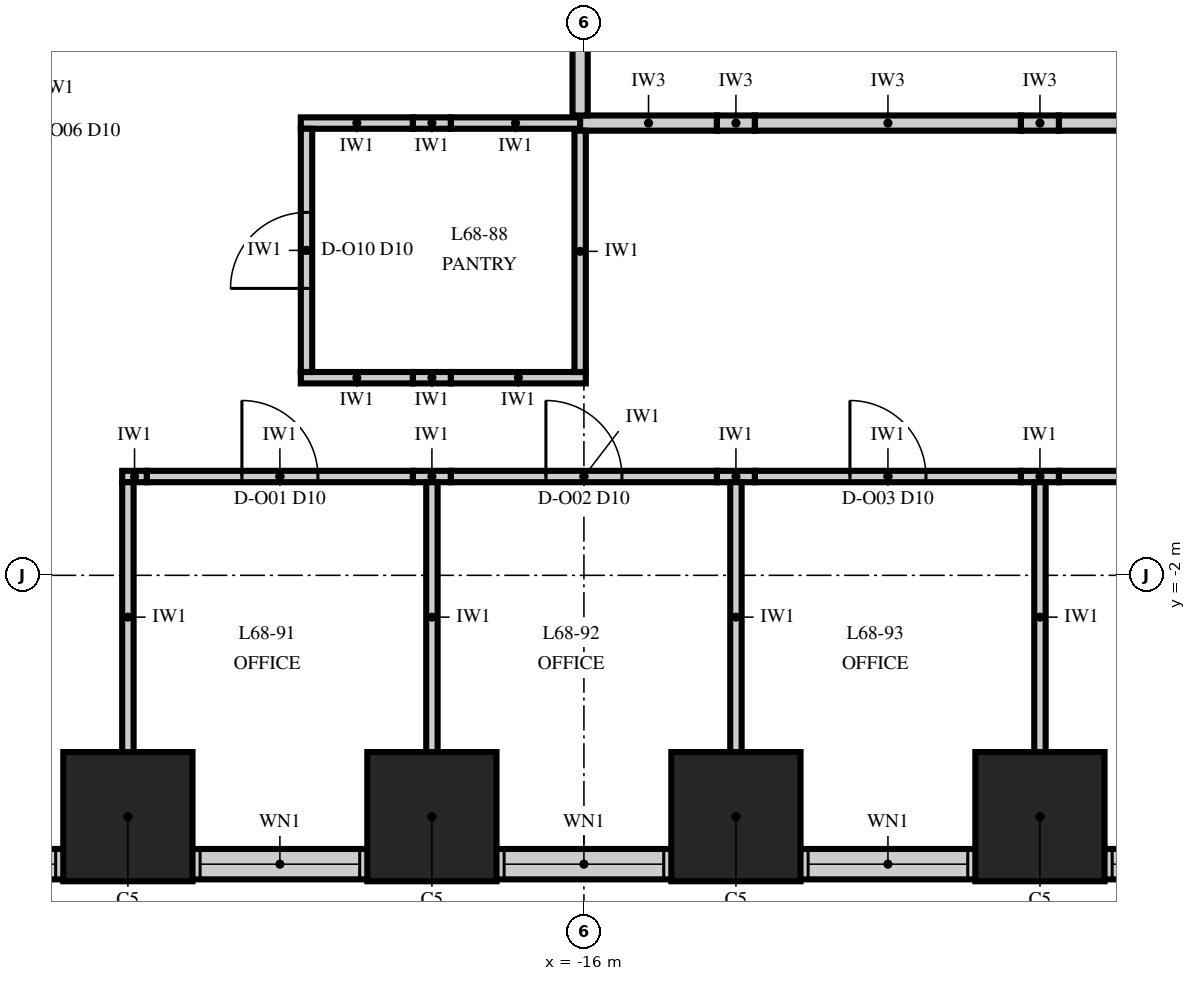
"""IFC4 building model, lengths in metres.
Left out: names, types, materials, properties, quantities, classifications, styles, units other than length and angle.
Written with IfcOpenShell. Run it as: python <this file> out.ifc"""

import sys

from ifc_helpers import new_model, si_unit, direction, frame, frame_2d, origin, origin_2d, place, context, subcontext, project, spatial, rectangle, extrude, element, fill, save


model = new_model("IFC4")
c1 = context("Model", 3, precision=1e-05, world=origin(), true_north=direction((0.0, 1.0)))
c2 = subcontext(c1, "Body", "Model", "MODEL_VIEW")
j1 = project(units=[si_unit("LENGTHUNIT", "METRE"), si_unit("PLANEANGLEUNIT", "RADIAN")], contexts=[c1])
p1 = place(None, origin())
s1 = spatial("IfcSite", under=j1, at=p1, CompositionType="ELEMENT")
p2 = place(p1, origin())
s2 = spatial("IfcBuilding", under=s1, at=p2, CompositionType="ELEMENT")
p3 = place(p2, frame((0.0, 0.0, 292.0)))
s3 = spatial("IfcBuildingStorey", under=s2, at=p3, CompositionType="ELEMENT", Elevation=292.0)
for number, where, z_axis, x_axis in (
    (1, (-22.0, -5.175, 0.0), (0.0, 0.0, 1.0), (1.0, 0.0, 0.0)),
    (2, (-18.0, -5.175, 0.0), (0.0, 0.0, 1.0), (1.0, 0.0, 0.0)),
    (3, (-14.0, -5.175, 0.0), (0.0, 0.0, 1.0), (1.0, 0.0, 0.0)),
    (4, (-10.0, -5.175, 0.0), (0.0, 0.0, 1.0), (1.0, 0.0, 0.0)),
):
    element("IfcColumn", number, at=place(p3, frame(where, z_axis=z_axis, x_axis=x_axis)), inside=s3, PredefinedType="COLUMN", context=c2, shape_type="SweptSolid", body=[
        extrude(rectangle(XDim=1.7, YDim=1.7, at=origin_2d()), origin(), (0.0, 0.0, 1.0), 3.75),
    ])
p4 = place(p3, frame((-26.0, -5.8, 0.0), z_axis=(0.0, 0.0, 1.0), x_axis=(1.0, 0.0, 0.0)))
e5 = element("IfcWall", 5, at=p4, inside=s3, PredefinedType="SOLIDWALL", context=c2, shape_type="SweptSolid", body=[
    extrude(rectangle(XDim=52.0, YDim=0.4, at=frame_2d((26.0, 0.0))), origin(), (0.0, 0.0, 1.0), 2.0),
])
p5 = place(p4, frame((0.95, 0.0, 0.8)))
e6 = element("IfcOpeningElement", 6, at=p5, cuts=e5, PredefinedType="OPENING", context=c2, shape_type="SweptSolid", body=[
    extrude(rectangle(XDim=2.1, YDim=1.15, at=frame_2d((1.05, 0.575))), frame((0.0, 0.215, 0.0), z_axis=(0.0, -1.0, 0.0), x_axis=(1.0, 0.0, 0.0)), (0.0, 0.0, 1.0), 0.43),
])
p6 = place(p4, frame((4.95, 0.0, 0.8)))
e7 = element("IfcOpeningElement", 7, at=p6, cuts=e5, PredefinedType="OPENING", context=c2, shape_type="SweptSolid", body=[
    extrude(rectangle(XDim=2.1, YDim=1.15, at=frame_2d((1.05, 0.575))), frame((0.0, 0.215, 0.0), z_axis=(0.0, -1.0, 0.0), x_axis=(1.0, 0.0, 0.0)), (0.0, 0.0, 1.0), 0.43),
])
p7 = place(p4, frame((8.95, 0.0, 0.8)))
e8 = element("IfcOpeningElement", 8, at=p7, cuts=e5, PredefinedType="OPENING", context=c2, shape_type="SweptSolid", body=[
    extrude(rectangle(XDim=2.1, YDim=1.15, at=frame_2d((1.05, 0.575))), frame((0.0, 0.215, 0.0), z_axis=(0.0, -1.0, 0.0), x_axis=(1.0, 0.0, 0.0)), (0.0, 0.0, 1.0), 0.43),
])
p8 = place(p4, frame((12.95, 0.0, 0.8)))
e9 = element("IfcOpeningElement", 9, at=p8, cuts=e5, PredefinedType="OPENING", context=c2, shape_type="SweptSolid", body=[
    extrude(rectangle(XDim=2.1, YDim=1.15, at=frame_2d((1.05, 0.575))), frame((0.0, 0.215, 0.0), z_axis=(0.0, -1.0, 0.0), x_axis=(1.0, 0.0, 0.0)), (0.0, 0.0, 1.0), 0.43),
])
p9 = place(p4, frame((16.95, 0.0, 0.8)))
e10 = element("IfcOpeningElement", 10, at=p9, cuts=e5, PredefinedType="OPENING", context=c2, shape_type="SweptSolid", body=[
    extrude(rectangle(XDim=2.1, YDim=1.15, at=frame_2d((1.05, 0.575))), frame((0.0, 0.215, 0.0), z_axis=(0.0, -1.0, 0.0), x_axis=(1.0, 0.0, 0.0)), (0.0, 0.0, 1.0), 0.43),
])
p10 = place(p4, frame((20.95, 0.0, 0.8)))
e11 = element("IfcOpeningElement", 11, at=p10, cuts=e5, PredefinedType="OPENING", context=c2, shape_type="SweptSolid", body=[
    extrude(rectangle(XDim=2.1, YDim=1.15, at=frame_2d((1.05, 0.575))), frame((0.0, 0.215, 0.0), z_axis=(0.0, -1.0, 0.0), x_axis=(1.0, 0.0, 0.0)), (0.0, 0.0, 1.0), 0.43),
])
p11 = place(p4, frame((24.95, 0.0, 0.8)))
e12 = element("IfcOpeningElement", 12, at=p11, cuts=e5, PredefinedType="OPENING", context=c2, shape_type="SweptSolid", body=[
    extrude(rectangle(XDim=2.1, YDim=1.15, at=frame_2d((1.05, 0.575))), frame((0.0, 0.215, 0.0), z_axis=(0.0, -1.0, 0.0), x_axis=(1.0, 0.0, 0.0)), (0.0, 0.0, 1.0), 0.43),
])
p12 = place(p4, frame((28.95, 0.0, 0.8)))
e13 = element("IfcOpeningElement", 13, at=p12, cuts=e5, PredefinedType="OPENING", context=c2, shape_type="SweptSolid", body=[
    extrude(rectangle(XDim=2.1, YDim=1.15, at=frame_2d((1.05, 0.575))), frame((0.0, 0.215, 0.0), z_axis=(0.0, -1.0, 0.0), x_axis=(1.0, 0.0, 0.0)), (0.0, 0.0, 1.0), 0.43),
])
p13 = place(p4, frame((32.95, 0.0, 0.8)))
e14 = element("IfcOpeningElement", 14, at=p13, cuts=e5, PredefinedType="OPENING", context=c2, shape_type="SweptSolid", body=[
    extrude(rectangle(XDim=2.1, YDim=1.15, at=frame_2d((1.05, 0.575))), frame((0.0, 0.215, 0.0), z_axis=(0.0, -1.0, 0.0), x_axis=(1.0, 0.0, 0.0)), (0.0, 0.0, 1.0), 0.43),
])
p14 = place(p4, frame((36.95, 0.0, 0.8)))
e15 = element("IfcOpeningElement", 15, at=p14, cuts=e5, PredefinedType="OPENING", context=c2, shape_type="SweptSolid", body=[
    extrude(rectangle(XDim=2.1, YDim=1.15, at=frame_2d((1.05, 0.575))), frame((0.0, 0.215, 0.0), z_axis=(0.0, -1.0, 0.0), x_axis=(1.0, 0.0, 0.0)), (0.0, 0.0, 1.0), 0.43),
])
p15 = place(p4, frame((40.95, 0.0, 0.8)))
e16 = element("IfcOpeningElement", 16, at=p15, cuts=e5, PredefinedType="OPENING", context=c2, shape_type="SweptSolid", body=[
    extrude(rectangle(XDim=2.1, YDim=1.15, at=frame_2d((1.05, 0.575))), frame((0.0, 0.215, 0.0), z_axis=(0.0, -1.0, 0.0), x_axis=(1.0, 0.0, 0.0)), (0.0, 0.0, 1.0), 0.43),
])
p16 = place(p4, frame((44.95, 0.0, 0.8)))
e17 = element("IfcOpeningElement", 17, at=p16, cuts=e5, PredefinedType="OPENING", context=c2, shape_type="SweptSolid", body=[
    extrude(rectangle(XDim=2.1, YDim=1.15, at=frame_2d((1.05, 0.575))), frame((0.0, 0.215, 0.0), z_axis=(0.0, -1.0, 0.0), x_axis=(1.0, 0.0, 0.0)), (0.0, 0.0, 1.0), 0.43),
])
p17 = place(p4, frame((48.95, 0.0, 0.8)))
e18 = element("IfcOpeningElement", 18, at=p17, cuts=e5, PredefinedType="OPENING", context=c2, shape_type="SweptSolid", body=[
    extrude(rectangle(XDim=2.1, YDim=1.15, at=frame_2d((1.05, 0.575))), frame((0.0, 0.215, 0.0), z_axis=(0.0, -1.0, 0.0), x_axis=(1.0, 0.0, 0.0)), (0.0, 0.0, 1.0), 0.43),
])
p18 = place(p3, frame((-22.075, -0.7, 0.0), z_axis=(0.0, 0.0, 1.0), x_axis=(1.0, 0.0, 0.0)))
e19 = element("IfcWall", 19, at=p18, inside=s3, PredefinedType="PARTITIONING", context=c2, shape_type="SweptSolid", body=[
    extrude(rectangle(XDim=0.325, YDim=0.15, at=frame_2d((0.163, 0.0))), origin(), (0.0, 0.0, 1.0), 2.15),
])
p19 = place(p3, frame((-21.75, -0.7, 0.0), z_axis=(0.0, 0.0, 1.0), x_axis=(1.0, 0.0, 0.0)))
e20 = element("IfcWall", 20, at=p19, inside=s3, PredefinedType="PARTITIONING", context=c2, shape_type="SweptSolid", body=[
    extrude(rectangle(XDim=3.5, YDim=0.15, at=frame_2d((1.75, 0.0))), origin(), (0.0, 0.0, 1.0), 3.85),
])
p20 = place(p19, frame((1.25, 0.0, 0.0)))
e21 = element("IfcOpeningElement", 21, at=p20, cuts=e20, PredefinedType="OPENING", context=c2, shape_type="SweptSolid", body=[
    extrude(rectangle(XDim=1.0, YDim=2.3, at=frame_2d((0.5, 1.15))), frame((0.0, 0.09, 0.0), z_axis=(0.0, -1.0, 0.0), x_axis=(1.0, 0.0, 0.0)), (0.0, 0.0, 1.0), 0.18),
])
p21 = place(p3, frame((-18.25, -0.7, 0.0), z_axis=(0.0, 0.0, 1.0), x_axis=(1.0, 0.0, 0.0)))
e22 = element("IfcWall", 22, at=p21, inside=s3, PredefinedType="PARTITIONING", context=c2, shape_type="SweptSolid", body=[
    extrude(rectangle(XDim=0.5, YDim=0.15, at=frame_2d((0.25, 0.0))), origin(), (0.0, 0.0, 1.0), 2.15),
])
p22 = place(p3, frame((-17.75, -0.7, 0.0), z_axis=(0.0, 0.0, 1.0), x_axis=(1.0, 0.0, 0.0)))
e23 = element("IfcWall", 23, at=p22, inside=s3, PredefinedType="PARTITIONING", context=c2, shape_type="SweptSolid", body=[
    extrude(rectangle(XDim=3.5, YDim=0.15, at=frame_2d((1.75, 0.0))), origin(), (0.0, 0.0, 1.0), 3.85),
])
p23 = place(p22, frame((1.25, 0.0, 0.0)))
e24 = element("IfcOpeningElement", 24, at=p23, cuts=e23, PredefinedType="OPENING", context=c2, shape_type="SweptSolid", body=[
    extrude(rectangle(XDim=1.0, YDim=2.3, at=frame_2d((0.5, 1.15))), frame((0.0, 0.09, 0.0), z_axis=(0.0, -1.0, 0.0), x_axis=(1.0, 0.0, 0.0)), (0.0, 0.0, 1.0), 0.18),
])
p24 = place(p3, frame((-14.25, -0.7, 0.0), z_axis=(0.0, 0.0, 1.0), x_axis=(1.0, 0.0, 0.0)))
e25 = element("IfcWall", 25, at=p24, inside=s3, PredefinedType="PARTITIONING", context=c2, shape_type="SweptSolid", body=[
    extrude(rectangle(XDim=0.5, YDim=0.15, at=frame_2d((0.25, 0.0))), origin(), (0.0, 0.0, 1.0), 2.15),
])
p25 = place(p3, frame((-13.75, -0.7, 0.0), z_axis=(0.0, 0.0, 1.0), x_axis=(1.0, 0.0, 0.0)))
e26 = element("IfcWall", 26, at=p25, inside=s3, PredefinedType="PARTITIONING", context=c2, shape_type="SweptSolid", body=[
    extrude(rectangle(XDim=3.5, YDim=0.15, at=frame_2d((1.75, 0.0))), origin(), (0.0, 0.0, 1.0), 3.85),
])
p26 = place(p25, frame((1.25, 0.0, 0.0)))
e27 = element("IfcOpeningElement", 27, at=p26, cuts=e26, PredefinedType="OPENING", context=c2, shape_type="SweptSolid", body=[
    extrude(rectangle(XDim=1.0, YDim=2.3, at=frame_2d((0.5, 1.15))), frame((0.0, 0.09, 0.0), z_axis=(0.0, -1.0, 0.0), x_axis=(1.0, 0.0, 0.0)), (0.0, 0.0, 1.0), 0.18),
])
p27 = place(p3, frame((-10.25, -0.7, 0.0), z_axis=(0.0, 0.0, 1.0), x_axis=(1.0, 0.0, 0.0)))
e28 = element("IfcWall", 28, at=p27, inside=s3, PredefinedType="PARTITIONING", context=c2, shape_type="SweptSolid", body=[
    extrude(rectangle(XDim=0.5, YDim=0.15, at=frame_2d((0.25, 0.0))), origin(), (0.0, 0.0, 1.0), 2.15),
])
p28 = place(p3, frame((-9.75, -0.7, 0.0), z_axis=(0.0, 0.0, 1.0), x_axis=(1.0, 0.0, 0.0)))
e29 = element("IfcWall", 29, at=p28, inside=s3, PredefinedType="PARTITIONING", context=c2, shape_type="SweptSolid", body=[
    extrude(rectangle(XDim=3.5, YDim=0.15, at=frame_2d((1.75, 0.0))), origin(), (0.0, 0.0, 1.0), 3.85),
])
p29 = place(p28, frame((1.25, 0.0, 0.0)))
e30 = element("IfcOpeningElement", 30, at=p29, cuts=e29, PredefinedType="OPENING", context=c2, shape_type="SweptSolid", body=[
    extrude(rectangle(XDim=1.0, YDim=2.3, at=frame_2d((0.5, 1.15))), frame((0.0, 0.09, 0.0), z_axis=(0.0, -1.0, 0.0), x_axis=(1.0, 0.0, 0.0)), (0.0, 0.0, 1.0), 0.18),
])
p30 = place(p3, frame((-19.725, 0.6, 0.0), z_axis=(0.0, 0.0, 1.0), x_axis=(1.0, 0.0, 0.0)))
e31 = element("IfcWall", 31, at=p30, inside=s3, PredefinedType="PARTITIONING", context=c2, shape_type="SweptSolid", body=[
    extrude(rectangle(XDim=1.475, YDim=0.15, at=frame_2d((0.738, 0.0))), origin(), (0.0, 0.0, 1.0), 3.85),
])
p31 = place(p3, frame((-18.25, 0.6, 0.0), z_axis=(0.0, 0.0, 1.0), x_axis=(1.0, 0.0, 0.0)))
e32 = element("IfcWall", 32, at=p31, inside=s3, PredefinedType="PARTITIONING", context=c2, shape_type="SweptSolid", body=[
    extrude(rectangle(XDim=0.5, YDim=0.15, at=frame_2d((0.25, 0.0))), origin(), (0.0, 0.0, 1.0), 2.15),
])
p32 = place(p3, frame((-17.75, 0.6, 0.0), z_axis=(0.0, 0.0, 1.0), x_axis=(1.0, 0.0, 0.0)))
e33 = element("IfcWall", 33, at=p32, inside=s3, PredefinedType="PARTITIONING", context=c2, shape_type="SweptSolid", body=[
    extrude(rectangle(XDim=1.775, YDim=0.15, at=frame_2d((0.887, 0.0))), origin(), (0.0, 0.0, 1.0), 3.85),
])
p33 = place(p3, frame((-19.725, 3.95, 0.0), z_axis=(0.0, 0.0, 1.0), x_axis=(1.0, 0.0, 0.0)))
e34 = element("IfcWall", 34, at=p33, inside=s3, PredefinedType="PARTITIONING", context=c2, shape_type="SweptSolid", body=[
    extrude(rectangle(XDim=1.475, YDim=0.15, at=frame_2d((0.738, 0.0))), origin(), (0.0, 0.0, 1.0), 3.85),
])
p34 = place(p3, frame((-18.25, 3.95, 0.0), z_axis=(0.0, 0.0, 1.0), x_axis=(1.0, 0.0, 0.0)))
e35 = element("IfcWall", 35, at=p34, inside=s3, PredefinedType="PARTITIONING", context=c2, shape_type="SweptSolid", body=[
    extrude(rectangle(XDim=0.5, YDim=0.15, at=frame_2d((0.25, 0.0))), origin(), (0.0, 0.0, 1.0), 2.15),
])
p35 = place(p3, frame((-17.75, 3.95, 0.0), z_axis=(0.0, 0.0, 1.0), x_axis=(1.0, 0.0, 0.0)))
e36 = element("IfcWall", 36, at=p35, inside=s3, PredefinedType="PARTITIONING", context=c2, shape_type="SweptSolid", body=[
    extrude(rectangle(XDim=1.7, YDim=0.15, at=frame_2d((0.85, 0.0))), origin(), (0.0, 0.0, 1.0), 3.85),
])
p36 = place(p3, frame((-16.05, 3.95, 0.0), z_axis=(0.0, 0.0, 1.0), x_axis=(1.0, 0.0, 0.0)))
e37 = element("IfcWall", 37, at=p36, inside=s3, PredefinedType="PARTITIONING", context=c2, shape_type="SweptSolid", body=[
    extrude(rectangle(XDim=1.8, YDim=0.2, at=frame_2d((0.9, 0.0))), origin(), (0.0, 0.0, 1.0), 3.85),
])
p37 = place(p3, frame((-14.25, 3.95, 0.0), z_axis=(0.0, 0.0, 1.0), x_axis=(1.0, 0.0, 0.0)))
e38 = element("IfcWall", 38, at=p37, inside=s3, PredefinedType="PARTITIONING", context=c2, shape_type="SweptSolid", body=[
    extrude(rectangle(XDim=0.5, YDim=0.2, at=frame_2d((0.25, 0.0))), origin(), (0.0, 0.0, 1.0), 2.15),
])
p38 = place(p3, frame((-13.75, 3.95, 0.0), z_axis=(0.0, 0.0, 1.0), x_axis=(1.0, 0.0, 0.0)))
e39 = element("IfcWall", 39, at=p38, inside=s3, PredefinedType="PARTITIONING", context=c2, shape_type="SweptSolid", body=[
    extrude(rectangle(XDim=3.5, YDim=0.2, at=frame_2d((1.75, 0.0))), origin(), (0.0, 0.0, 1.0), 3.85),
])
p39 = place(p3, frame((-10.25, 3.95, 0.0), z_axis=(0.0, 0.0, 1.0), x_axis=(1.0, 0.0, 0.0)))
e40 = element("IfcWall", 40, at=p39, inside=s3, PredefinedType="PARTITIONING", context=c2, shape_type="SweptSolid", body=[
    extrude(rectangle(XDim=0.5, YDim=0.2, at=frame_2d((0.25, 0.0))), origin(), (0.0, 0.0, 1.0), 2.15),
])
p40 = place(p3, frame((-9.75, 3.95, 0.0), z_axis=(0.0, 0.0, 1.0), x_axis=(1.0, 0.0, 0.0)))
e41 = element("IfcWall", 41, at=p40, inside=s3, PredefinedType="PARTITIONING", context=c2, shape_type="SweptSolid", body=[
    extrude(rectangle(XDim=3.5, YDim=0.2, at=frame_2d((1.75, 0.0))), origin(), (0.0, 0.0, 1.0), 3.85),
])
p41 = place(p40, frame((1.15, 0.0, 0.0)))
e42 = element("IfcOpeningElement", 42, at=p41, cuts=e41, PredefinedType="OPENING", context=c2, shape_type="SweptSolid", body=[
    extrude(rectangle(XDim=1.2, YDim=2.4, at=frame_2d((0.6, 1.2))), frame((0.0, 0.115, 0.0), z_axis=(0.0, -1.0, 0.0), x_axis=(1.0, 0.0, 0.0)), (0.0, 0.0, 1.0), 0.23),
])
p42 = place(p3, frame((-22.0, -4.325, 0.0), z_axis=(0.0, 0.0, 1.0), x_axis=(0.0, 1.0, 0.0)))
e43 = element("IfcWall", 43, at=p42, inside=s3, PredefinedType="PARTITIONING", context=c2, shape_type="SweptSolid", body=[
    extrude(rectangle(XDim=3.55, YDim=0.15, at=frame_2d((1.775, 0.0))), origin(), (0.0, 0.0, 1.0), 2.15),
])
p43 = place(p3, frame((-19.65, 0.675, 0.0), z_axis=(0.0, 0.0, 1.0), x_axis=(0.0, 1.0, 0.0)))
e44 = element("IfcWall", 44, at=p43, inside=s3, PredefinedType="PARTITIONING", context=c2, shape_type="SweptSolid", body=[
    extrude(rectangle(XDim=3.2, YDim=0.15, at=frame_2d((1.6, 0.0))), origin(), (0.0, 0.0, 1.0), 3.85),
])
p44 = place(p43, frame((1.1, 0.0, 0.0)))
e45 = element("IfcOpeningElement", 45, at=p44, cuts=e44, PredefinedType="OPENING", context=c2, shape_type="SweptSolid", body=[
    extrude(rectangle(XDim=1.0, YDim=2.3, at=frame_2d((0.5, 1.15))), frame((0.0, 0.09, 0.0), z_axis=(0.0, -1.0, 0.0), x_axis=(1.0, 0.0, 0.0)), (0.0, 0.0, 1.0), 0.18),
])
p45 = place(p3, frame((-18.0, -4.325, 0.0), z_axis=(0.0, 0.0, 1.0), x_axis=(0.0, 1.0, 0.0)))
e46 = element("IfcWall", 46, at=p45, inside=s3, PredefinedType="PARTITIONING", context=c2, shape_type="SweptSolid", body=[
    extrude(rectangle(XDim=3.55, YDim=0.15, at=frame_2d((1.775, 0.0))), origin(), (0.0, 0.0, 1.0), 2.15),
])
p46 = place(p3, frame((-16.05, 0.675, 0.0), z_axis=(0.0, 0.0, 1.0), x_axis=(0.0, 1.0, 0.0)))
e47 = element("IfcWall", 47, at=p46, inside=s3, PredefinedType="PARTITIONING", context=c2, shape_type="SweptSolid", body=[
    extrude(rectangle(XDim=3.175, YDim=0.15, at=frame_2d((1.587, 0.0))), origin(), (0.0, 0.0, 1.0), 3.85),
])
p47 = place(p3, frame((-16.05, 4.05, 0.0), z_axis=(0.0, 0.0, 1.0), x_axis=(0.0, 1.0, 0.0)))
e48 = element("IfcWall", 48, at=p47, inside=s3, PredefinedType="PARTITIONING", context=c2, shape_type="SweptSolid", body=[
    extrude(rectangle(XDim=21.9, YDim=0.2, at=frame_2d((10.95, 0.0))), origin(), (0.0, 0.0, 1.0), 2.842),
])
p48 = place(p47, frame((20.35, 0.0, 0.0)))
e49 = element("IfcOpeningElement", 49, at=p48, cuts=e48, PredefinedType="OPENING", context=c2, shape_type="SweptSolid", body=[
    extrude(rectangle(XDim=1.2, YDim=2.4, at=frame_2d((0.6, 1.2))), frame((0.0, 0.115, 0.0), z_axis=(0.0, -1.0, 0.0), x_axis=(1.0, 0.0, 0.0)), (0.0, 0.0, 1.0), 0.23),
])
p49 = place(p47, frame((10.35, 0.0, 0.0)))
e50 = element("IfcOpeningElement", 50, at=p49, cuts=e48, PredefinedType="OPENING", context=c2, shape_type="SweptSolid", body=[
    extrude(rectangle(XDim=1.2, YDim=2.4, at=frame_2d((0.6, 1.2))), frame((0.0, 0.115, 0.0), z_axis=(0.0, -1.0, 0.0), x_axis=(1.0, 0.0, 0.0)), (0.0, 0.0, 1.0), 0.23),
])
for number, where, z_axis, x_axis in (
    (51, (-14.0, -4.325, 0.0), (0.0, 0.0, 1.0), (0.0, 1.0, 0.0)),
    (52, (-10.0, -4.325, 0.0), (0.0, 0.0, 1.0), (0.0, 1.0, 0.0)),
):
    element("IfcWall", number, at=place(p3, frame(where, z_axis=z_axis, x_axis=x_axis)), inside=s3, PredefinedType="PARTITIONING", context=c2, shape_type="SweptSolid", body=[
        extrude(rectangle(XDim=3.55, YDim=0.15, at=frame_2d((1.775, 0.0))), origin(), (0.0, 0.0, 1.0), 2.15),
    ])
p50 = place(p5, origin())
e53 = element("IfcWindow", 53, at=p50, inside=s3, PartitioningType="SINGLE_PANEL", PredefinedType="WINDOW", context=c2, shape_type="SweptSolid", body=[
    extrude(rectangle(XDim=2.1, YDim=1.15, at=frame_2d((1.05, 0.575))), frame((0.0, 0.03, 0.0), z_axis=(0.0, -1.0, 0.0), x_axis=(1.0, 0.0, 0.0)), (0.0, 0.0, 1.0), 0.06),
])
fill(e6, e53)
p51 = place(p6, origin())
e54 = element("IfcWindow", 54, at=p51, inside=s3, PartitioningType="SINGLE_PANEL", PredefinedType="WINDOW", context=c2, shape_type="SweptSolid", body=[
    extrude(rectangle(XDim=2.1, YDim=1.15, at=frame_2d((1.05, 0.575))), frame((0.0, 0.03, 0.0), z_axis=(0.0, -1.0, 0.0), x_axis=(1.0, 0.0, 0.0)), (0.0, 0.0, 1.0), 0.06),
])
fill(e7, e54)
p52 = place(p7, origin())
e55 = element("IfcWindow", 55, at=p52, inside=s3, PartitioningType="SINGLE_PANEL", PredefinedType="WINDOW", context=c2, shape_type="SweptSolid", body=[
    extrude(rectangle(XDim=2.1, YDim=1.15, at=frame_2d((1.05, 0.575))), frame((0.0, 0.03, 0.0), z_axis=(0.0, -1.0, 0.0), x_axis=(1.0, 0.0, 0.0)), (0.0, 0.0, 1.0), 0.06),
])
fill(e8, e55)
p53 = place(p8, origin())
e56 = element("IfcWindow", 56, at=p53, inside=s3, PartitioningType="SINGLE_PANEL", PredefinedType="WINDOW", context=c2, shape_type="SweptSolid", body=[
    extrude(rectangle(XDim=2.1, YDim=1.15, at=frame_2d((1.05, 0.575))), frame((0.0, 0.03, 0.0), z_axis=(0.0, -1.0, 0.0), x_axis=(1.0, 0.0, 0.0)), (0.0, 0.0, 1.0), 0.06),
])
fill(e9, e56)
p54 = place(p9, origin())
e57 = element("IfcWindow", 57, at=p54, inside=s3, PartitioningType="SINGLE_PANEL", PredefinedType="WINDOW", context=c2, shape_type="SweptSolid", body=[
    extrude(rectangle(XDim=2.1, YDim=1.15, at=frame_2d((1.05, 0.575))), frame((0.0, 0.03, 0.0), z_axis=(0.0, -1.0, 0.0), x_axis=(1.0, 0.0, 0.0)), (0.0, 0.0, 1.0), 0.06),
])
fill(e10, e57)
p55 = place(p20, origin())
e58 = element("IfcDoor", 58, at=p55, inside=s3, OperationType="SINGLE_SWING_LEFT", PredefinedType="DOOR", context=c2, shape_type="SweptSolid", body=[
    extrude(rectangle(XDim=1.0, YDim=2.3, at=frame_2d((0.5, 1.15))), frame((0.0, 0.075, 0.0), z_axis=(0.0, -1.0, 0.0), x_axis=(1.0, 0.0, 0.0)), (0.0, 0.0, 1.0), 0.149),
])
fill(e21, e58)
p56 = place(p23, origin())
e59 = element("IfcDoor", 59, at=p56, inside=s3, OperationType="SINGLE_SWING_LEFT", PredefinedType="DOOR", context=c2, shape_type="SweptSolid", body=[
    extrude(rectangle(XDim=1.0, YDim=2.3, at=frame_2d((0.5, 1.15))), frame((0.0, 0.075, 0.0), z_axis=(0.0, -1.0, 0.0), x_axis=(1.0, 0.0, 0.0)), (0.0, 0.0, 1.0), 0.149),
])
fill(e24, e59)
p57 = place(p26, origin())
e60 = element("IfcDoor", 60, at=p57, inside=s3, OperationType="SINGLE_SWING_LEFT", PredefinedType="DOOR", context=c2, shape_type="SweptSolid", body=[
    extrude(rectangle(XDim=1.0, YDim=2.3, at=frame_2d((0.5, 1.15))), frame((0.0, 0.075, 0.0), z_axis=(0.0, -1.0, 0.0), x_axis=(1.0, 0.0, 0.0)), (0.0, 0.0, 1.0), 0.149),
])
fill(e27, e60)
p58 = place(p44, origin())
e61 = element("IfcDoor", 61, at=p58, inside=s3, OperationType="SINGLE_SWING_LEFT", PredefinedType="DOOR", context=c2, shape_type="SweptSolid", body=[
    extrude(rectangle(XDim=1.0, YDim=2.3, at=frame_2d((0.5, 1.15))), frame((0.0, 0.075, 0.0), z_axis=(0.0, -1.0, 0.0), x_axis=(1.0, 0.0, 0.0)), (0.0, 0.0, 1.0), 0.149),
])
fill(e45, e61)
save(model, sys.argv[1])
